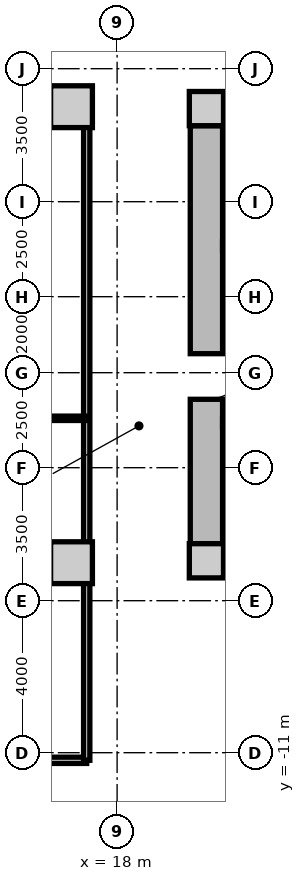
"""IFC4 building model, lengths in metres.
Left out: names, types, materials, properties, quantities, classifications, styles, units other than length and angle.
Written with IfcOpenShell. Run it as: python <this file> out.ifc"""

import sys

from ifc_helpers import new_model, si_unit, direction, frame, frame_2d, origin, origin_2d, place, context, subcontext, project, spatial, rectangle, extrude, source, transform, mapped, element, fill, save


model = new_model("IFC4")
c1 = context("Model", 3, precision=1e-05, world=origin(), true_north=direction((0.0, 1.0)))
c2 = subcontext(c1, "Body", "Model", "MODEL_VIEW")
j1 = project(units=[si_unit("LENGTHUNIT", "METRE"), si_unit("PLANEANGLEUNIT", "RADIAN")], contexts=[c1])
p1 = place(None, origin())
s1 = spatial("IfcSite", under=j1, at=p1, CompositionType="ELEMENT")
p2 = place(p1, origin())
s2 = spatial("IfcBuilding", under=s1, at=p2, CompositionType="ELEMENT")
p3 = place(p2, frame((0.0, 0.0, 12.6)))
s3 = spatial("IfcBuildingStorey", under=s2, at=p3, CompositionType="ELEMENT", Elevation=12.6)
m1 = source(origin(), c2, "Body", "SweptSolid", [
    extrude(rectangle(XDim=0.9, YDim=0.9, at=origin_2d()), origin(), (0.0, 0.0, 1.0), 4.2),
])
for number, where, z_axis, x_axis in (
    (1, (20.35, -5.95, 0.0), (0.0, 0.0, 1.0), (1.0, 0.0, 0.0)),
    (2, (20.35, 5.95, 0.0), (0.0, 0.0, 1.0), (1.0, 0.0, 0.0)),
):
    element("IfcColumn", number, at=place(p3, frame(where, z_axis=z_axis, x_axis=x_axis)), inside=s3, PredefinedType="COLUMN", context=c2, shape_type="MappedRepresentation", body=[
        mapped(m1, transform((0.0, 0.0, 0.0), x_axis=(1.0, 0.0, 0.0), y_axis=(0.0, 1.0, 0.0), z_axis=(0.0, 0.0, 1.0), scale=1.0)),
    ])
m2 = source(origin(), c2, "Body", "SweptSolid", [
    extrude(rectangle(XDim=14.4, YDim=0.85, at=frame_2d((7.2, 0.0))), origin(), (0.0, 0.0, 1.0), 3.88),
])
for number, where, z_axis, x_axis in (
    (3, (20.8, 5.95, 0.0), (0.0, 0.0, 1.0), (1.0, 0.0, 0.0)),
    (4, (35.2, -5.95, 0.0), (0.0, 0.0, 1.0), (-1.0, 0.0, 0.0)),
):
    element("IfcWall", number, at=place(p3, frame(where, z_axis=z_axis, x_axis=x_axis)), inside=s3, PredefinedType="SHEAR", context=c2, shape_type="MappedRepresentation", body=[
        mapped(m2, transform((0.0, 0.0, 0.0), x_axis=(1.0, 0.0, 0.0), y_axis=(0.0, 1.0, 0.0), z_axis=(0.0, 0.0, 1.0), scale=1.0)),
    ])
m3 = source(origin(), c2, "Body", "SweptSolid", [
    extrude(rectangle(XDim=11.0, YDim=0.85, at=frame_2d((5.5, 0.0))), origin(), (0.0, 0.0, 1.0), 3.88),
])
p4 = place(p3, frame((20.35, -5.5, 0.0), z_axis=(0.0, 0.0, 1.0), x_axis=(0.0, 1.0, 0.0)))
e5 = element("IfcWall", 5, at=p4, inside=s3, PredefinedType="SHEAR", context=c2, shape_type="MappedRepresentation", body=[
    mapped(m3, transform((0.0, 0.0, 0.0), x_axis=(1.0, 0.0, 0.0), y_axis=(0.0, 1.0, 0.0), z_axis=(0.0, 0.0, 1.0), scale=1.0)),
])
p5 = place(p4, frame((3.8, 0.0, 0.0)))
e6 = element("IfcOpeningElement", 6, at=p5, cuts=e5, PredefinedType="OPENING", context=c2, shape_type="SweptSolid", body=[
    extrude(rectangle(XDim=1.2, YDim=2.15, at=frame_2d((0.6, 1.075))), frame((0.0, 0.435, 0.0), z_axis=(0.0, -1.0, 0.0), x_axis=(1.0, 0.0, 0.0)), (0.0, 0.0, 1.0), 0.87),
])
m4 = source(origin(), c2, "Body", "SweptSolid", [
    extrude(rectangle(XDim=1.1, YDim=1.1, at=origin_2d()), origin(), (0.0, 0.0, 1.0), 4.2),
])
for number, where, z_axis, x_axis in (
    (7, (16.8, -6.0, 0.0), (0.0, 0.0, 1.0), (1.0, 0.0, 0.0)),
    (8, (16.8, 6.0, 0.0), (0.0, 0.0, 1.0), (1.0, 0.0, 0.0)),
):
    element("IfcColumn", number, at=place(p3, frame(where, z_axis=z_axis, x_axis=x_axis)), inside=s3, PredefinedType="COLUMN", context=c2, shape_type="MappedRepresentation", body=[
        mapped(m4, transform((0.0, 0.0, 0.0), x_axis=(1.0, 0.0, 0.0), y_axis=(0.0, 1.0, 0.0), z_axis=(0.0, 0.0, 1.0), scale=1.0)),
    ])
m5 = source(origin(), c2, "Body", "SweptSolid", [
    extrude(rectangle(XDim=7.765, YDim=0.24, at=frame_2d((3.883, 0.0))), origin(), (0.0, 0.0, 1.0), 3.88),
])
p6 = place(p3, frame((20.775, 2.33, 0.0), z_axis=(0.0, 0.0, 1.0), x_axis=(1.0, 0.0, 0.0)))
e9 = element("IfcWall", 9, at=p6, inside=s3, PredefinedType="PARTITIONING", context=c2, shape_type="MappedRepresentation", body=[
    mapped(m5, transform((0.0, 0.0, 0.0), x_axis=(1.0, 0.0, 0.0), y_axis=(0.0, 1.0, 0.0), z_axis=(0.0, 0.0, 1.0), scale=1.0)),
])
p7 = place(p3, frame((20.775, -2.33, 0.0), z_axis=(0.0, 0.0, 1.0), x_axis=(1.0, 0.0, 0.0)))
e10 = element("IfcWall", 10, at=p7, inside=s3, PredefinedType="PARTITIONING", context=c2, shape_type="MappedRepresentation", body=[
    mapped(m5, transform((0.0, 0.0, 0.0), x_axis=(1.0, 0.0, 0.0), y_axis=(0.0, 1.0, 0.0), z_axis=(0.0, 0.0, 1.0), scale=1.0)),
])
p8 = place(p7, frame((0.885, 0.0, 0.0)))
e11 = element("IfcOpeningElement", 11, at=p8, cuts=e10, PredefinedType="OPENING", context=c2, shape_type="SweptSolid", body=[
    extrude(rectangle(XDim=1.1, YDim=2.15, at=frame_2d((0.55, 1.075))), frame((0.0, 0.13, 0.0), z_axis=(0.0, -1.0, 0.0), x_axis=(1.0, 0.0, 0.0)), (0.0, 0.0, 1.0), 0.26),
])
m6 = source(origin(), c2, "Body", "SweptSolid", [
    extrude(rectangle(XDim=7.62, YDim=0.24, at=frame_2d((3.81, 0.0))), origin(), (0.0, 0.0, 1.0), 3.865),
])
p9 = place(p3, frame((20.8, -0.13, 0.0), z_axis=(0.0, 0.0, 1.0), x_axis=(1.0, 0.0, 0.0)))
e12 = element("IfcWall", 12, at=p9, inside=s3, PredefinedType="PARTITIONING", context=c2, shape_type="MappedRepresentation", body=[
    mapped(m6, transform((0.0, 0.0, 0.0), x_axis=(1.0, 0.0, 0.0), y_axis=(0.0, 1.0, 0.0), z_axis=(0.0, 0.0, 1.0), scale=1.0)),
])
p10 = place(p9, frame((6.22, 0.0, 0.0)))
e13 = element("IfcOpeningElement", 13, at=p10, cuts=e12, PredefinedType="OPENING", context=c2, shape_type="SweptSolid", body=[
    extrude(rectangle(XDim=1.0, YDim=2.1, at=frame_2d((0.5, 1.05))), frame((0.0, 0.13, 0.0), z_axis=(0.0, -1.0, 0.0), x_axis=(1.0, 0.0, 0.0)), (0.0, 0.0, 1.0), 0.26),
])
p11 = place(p9, frame((0.85, 0.0, 0.0)))
e14 = element("IfcOpeningElement", 14, at=p11, cuts=e12, PredefinedType="OPENING", context=c2, shape_type="SweptSolid", body=[
    extrude(rectangle(XDim=1.1, YDim=2.2, at=frame_2d((0.55, 1.1))), frame((0.0, 0.13, 0.0), z_axis=(0.0, -1.0, 0.0), x_axis=(1.0, 0.0, 0.0)), (0.0, 0.0, 1.0), 0.26),
])
p12 = place(p9, frame((3.85, 0.0, 0.0)))
e15 = element("IfcOpeningElement", 15, at=p12, cuts=e12, PredefinedType="OPENING", context=c2, shape_type="SweptSolid", body=[
    extrude(rectangle(XDim=1.1, YDim=2.2, at=frame_2d((0.55, 1.1))), frame((0.0, 0.13, 0.0), z_axis=(0.0, -1.0, 0.0), x_axis=(1.0, 0.0, 0.0)), (0.0, 0.0, 1.0), 0.26),
])
m7 = source(origin(), c2, "Body", "SweptSolid", [
    extrude(rectangle(XDim=34.4, YDim=0.165, at=frame_2d((17.2, 0.0))), origin(), (0.0, 0.0, 1.0), 3.865),
])
p13 = place(p3, frame((-17.2, -11.2, 0.0), z_axis=(0.0, 0.0, 1.0), x_axis=(1.0, 0.0, 0.0)))
e16 = element("IfcWall", 16, at=p13, inside=s3, PredefinedType="PARTITIONING", context=c2, shape_type="MappedRepresentation", body=[
    mapped(m7, transform((0.0, 0.0, 0.0), x_axis=(1.0, 0.0, 0.0), y_axis=(0.0, 1.0, 0.0), z_axis=(0.0, 0.0, 1.0), scale=1.0)),
])
p14 = place(p13, frame((2.2, 0.0, 0.0)))
e17 = element("IfcOpeningElement", 17, at=p14, cuts=e16, PredefinedType="OPENING", context=c2, shape_type="SweptSolid", body=[
    extrude(rectangle(XDim=1.05, YDim=2.15, at=frame_2d((0.525, 1.075))), frame((0.0, 0.093, 0.0), z_axis=(0.0, -1.0, 0.0), x_axis=(1.0, 0.0, 0.0)), (0.0, 0.0, 1.0), 0.185),
])
p15 = place(p13, frame((7.55, 0.0, 0.0)))
e18 = element("IfcOpeningElement", 18, at=p15, cuts=e16, PredefinedType="OPENING", context=c2, shape_type="SweptSolid", body=[
    extrude(rectangle(XDim=1.05, YDim=2.15, at=frame_2d((0.525, 1.075))), frame((0.0, 0.093, 0.0), z_axis=(0.0, -1.0, 0.0), x_axis=(1.0, 0.0, 0.0)), (0.0, 0.0, 1.0), 0.185),
])
p16 = place(p13, frame((13.45, 0.0, 0.0)))
e19 = element("IfcOpeningElement", 19, at=p16, cuts=e16, PredefinedType="OPENING", context=c2, shape_type="SweptSolid", body=[
    extrude(rectangle(XDim=1.05, YDim=2.15, at=frame_2d((0.525, 1.075))), frame((0.0, 0.093, 0.0), z_axis=(0.0, -1.0, 0.0), x_axis=(1.0, 0.0, 0.0)), (0.0, 0.0, 1.0), 0.185),
])
p17 = place(p13, frame((19.95, 0.0, 0.0)))
e20 = element("IfcOpeningElement", 20, at=p17, cuts=e16, PredefinedType="OPENING", context=c2, shape_type="SweptSolid", body=[
    extrude(rectangle(XDim=1.05, YDim=2.15, at=frame_2d((0.525, 1.075))), frame((0.0, 0.093, 0.0), z_axis=(0.0, -1.0, 0.0), x_axis=(1.0, 0.0, 0.0)), (0.0, 0.0, 1.0), 0.185),
])
p18 = place(p13, frame((25.85, 0.0, 0.0)))
e21 = element("IfcOpeningElement", 21, at=p18, cuts=e16, PredefinedType="OPENING", context=c2, shape_type="SweptSolid", body=[
    extrude(rectangle(XDim=1.05, YDim=2.15, at=frame_2d((0.525, 1.075))), frame((0.0, 0.093, 0.0), z_axis=(0.0, -1.0, 0.0), x_axis=(1.0, 0.0, 0.0)), (0.0, 0.0, 1.0), 0.185),
])
p19 = place(p13, frame((31.2, 0.0, 0.0)))
e22 = element("IfcOpeningElement", 22, at=p19, cuts=e16, PredefinedType="OPENING", context=c2, shape_type="SweptSolid", body=[
    extrude(rectangle(XDim=1.05, YDim=2.15, at=frame_2d((0.525, 1.075))), frame((0.0, 0.093, 0.0), z_axis=(0.0, -1.0, 0.0), x_axis=(1.0, 0.0, 0.0)), (0.0, 0.0, 1.0), 0.185),
])
p20 = place(p3, frame((-17.2, 6.4, 0.0), z_axis=(0.0, 0.0, 1.0), x_axis=(1.0, 0.0, 0.0)))
e23 = element("IfcWall", 23, at=p20, inside=s3, PredefinedType="PARTITIONING", context=c2, shape_type="MappedRepresentation", body=[
    mapped(m7, transform((0.0, 0.0, 0.0), x_axis=(1.0, 0.0, 0.0), y_axis=(0.0, 1.0, 0.0), z_axis=(0.0, 0.0, 1.0), scale=1.0)),
])
p21 = place(p20, frame((2.2, 0.0, 0.0)))
e24 = element("IfcOpeningElement", 24, at=p21, cuts=e23, PredefinedType="OPENING", context=c2, shape_type="SweptSolid", body=[
    extrude(rectangle(XDim=1.05, YDim=2.15, at=frame_2d((0.525, 1.075))), frame((0.0, 0.093, 0.0), z_axis=(0.0, -1.0, 0.0), x_axis=(1.0, 0.0, 0.0)), (0.0, 0.0, 1.0), 0.185),
])
p22 = place(p20, frame((7.55, 0.0, 0.0)))
e25 = element("IfcOpeningElement", 25, at=p22, cuts=e23, PredefinedType="OPENING", context=c2, shape_type="SweptSolid", body=[
    extrude(rectangle(XDim=1.05, YDim=2.15, at=frame_2d((0.525, 1.075))), frame((0.0, 0.093, 0.0), z_axis=(0.0, -1.0, 0.0), x_axis=(1.0, 0.0, 0.0)), (0.0, 0.0, 1.0), 0.185),
])
p23 = place(p20, frame((13.45, 0.0, 0.0)))
e26 = element("IfcOpeningElement", 26, at=p23, cuts=e23, PredefinedType="OPENING", context=c2, shape_type="SweptSolid", body=[
    extrude(rectangle(XDim=0.92, YDim=2.1, at=frame_2d((0.46, 1.05))), frame((0.0, 0.093, 0.0), z_axis=(0.0, -1.0, 0.0), x_axis=(1.0, 0.0, 0.0)), (0.0, 0.0, 1.0), 0.185),
])
p24 = place(p20, frame((19.95, 0.0, 0.0)))
e27 = element("IfcOpeningElement", 27, at=p24, cuts=e23, PredefinedType="OPENING", context=c2, shape_type="SweptSolid", body=[
    extrude(rectangle(XDim=1.05, YDim=2.15, at=frame_2d((0.525, 1.075))), frame((0.0, 0.093, 0.0), z_axis=(0.0, -1.0, 0.0), x_axis=(1.0, 0.0, 0.0)), (0.0, 0.0, 1.0), 0.185),
])
p25 = place(p20, frame((25.85, 0.0, 0.0)))
e28 = element("IfcOpeningElement", 28, at=p25, cuts=e23, PredefinedType="OPENING", context=c2, shape_type="SweptSolid", body=[
    extrude(rectangle(XDim=1.05, YDim=2.15, at=frame_2d((0.525, 1.075))), frame((0.0, 0.093, 0.0), z_axis=(0.0, -1.0, 0.0), x_axis=(1.0, 0.0, 0.0)), (0.0, 0.0, 1.0), 0.185),
])
p26 = place(p20, frame((31.2, 0.0, 0.0)))
e29 = element("IfcOpeningElement", 29, at=p26, cuts=e23, PredefinedType="OPENING", context=c2, shape_type="SweptSolid", body=[
    extrude(rectangle(XDim=0.92, YDim=2.1, at=frame_2d((0.46, 1.05))), frame((0.0, 0.093, 0.0), z_axis=(0.0, -1.0, 0.0), x_axis=(1.0, 0.0, 0.0)), (0.0, 0.0, 1.0), 0.185),
])
m8 = source(origin(), c2, "Body", "SweptSolid", [
    extrude(rectangle(XDim=17.6, YDim=0.165, at=frame_2d((8.8, 0.0))), origin(), (0.0, 0.0, 1.0), 3.865),
])
p27 = place(p3, frame((17.2, -11.2, 0.0), z_axis=(0.0, 0.0, 1.0), x_axis=(0.0, 1.0, 0.0)))
e30 = element("IfcWall", 30, at=p27, inside=s3, PredefinedType="PARTITIONING", context=c2, shape_type="MappedRepresentation", body=[
    mapped(m8, transform((0.0, 0.0, 0.0), x_axis=(1.0, 0.0, 0.0), y_axis=(0.0, 1.0, 0.0), z_axis=(0.0, 0.0, 1.0), scale=1.0)),
])
m9 = source(origin(), c2, "Body", "SweptSolid", [
    extrude(rectangle(XDim=34.4, YDim=0.115, at=frame_2d((17.2, 0.0))), origin(), (0.0, 0.0, 1.0), 3.865),
])
p28 = place(p3, frame((-17.2, -2.2, 0.0), z_axis=(0.0, 0.0, 1.0), x_axis=(1.0, 0.0, 0.0)))
e31 = element("IfcWall", 31, at=p28, inside=s3, PredefinedType="PARTITIONING", context=c2, shape_type="MappedRepresentation", body=[
    mapped(m9, transform((0.0, 0.0, 0.0), x_axis=(1.0, 0.0, 0.0), y_axis=(0.0, 1.0, 0.0), z_axis=(0.0, 0.0, 1.0), scale=1.0)),
])
m10 = source(origin(), c2, "Body", "SweptSolid", [
    extrude(rectangle(XDim=1.2, YDim=2.15, at=frame_2d((0.6, 1.075))), frame((0.0, 0.025, 0.0), z_axis=(0.0, -1.0, 0.0), x_axis=(1.0, 0.0, 0.0)), (0.0, 0.0, 1.0), 0.05),
])
p29 = place(p5, frame((1.2, 0.0, 0.0), z_axis=(0.0, 0.0, 1.0), x_axis=(-1.0, 0.0, 0.0)))
e32 = element("IfcDoor", 32, at=p29, inside=s3, OperationType="SINGLE_SWING_LEFT", PredefinedType="DOOR", context=c2, shape_type="MappedRepresentation", body=[
    mapped(m10, transform((0.0, 0.0, 0.0), x_axis=(1.0, 0.0, 0.0), y_axis=(0.0, 1.0, 0.0), z_axis=(0.0, 0.0, 1.0), scale=1.0)),
])
fill(e6, e32)
save(model, sys.argv[1])
